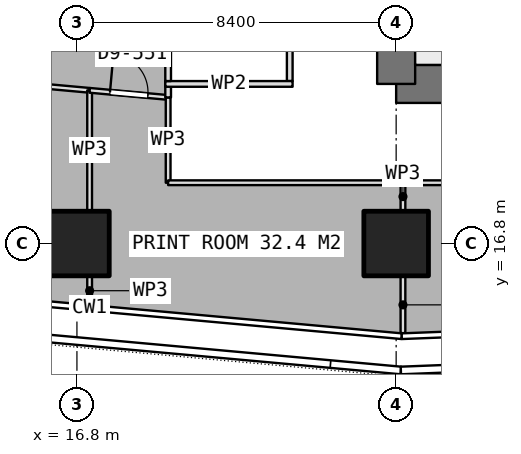
"""IFC4 building model, lengths in metres.
Left out: names, types, materials, properties, quantities, classifications, styles, units other than length and angle.
Written with IfcOpenShell. Run it as: python <this file> out.ifc"""

import sys

from ifc_helpers import new_model, si_unit, direction, frame, frame_2d, origin, origin_2d, place, context, subcontext, project, spatial, rectangle, extrude, element, fill, save


model = new_model("IFC4")
c1 = context("Model", 3, precision=1e-05, world=origin(), true_north=direction((0.0, 1.0)))
c2 = subcontext(c1, "Body", "Model", "MODEL_VIEW")
j1 = project(units=[si_unit("LENGTHUNIT", "METRE"), si_unit("PLANEANGLEUNIT", "RADIAN")], contexts=[c1])
p1 = place(None, origin())
s1 = spatial("IfcSite", under=j1, at=p1, CompositionType="ELEMENT")
p2 = place(p1, origin())
s2 = spatial("IfcBuilding", under=s1, at=p2, CompositionType="ELEMENT")
p3 = place(p2, frame((0.0, 0.0, 140.3)))
s3 = spatial("IfcBuildingStorey", under=s2, at=p3, CompositionType="ELEMENT", Elevation=140.3)
p4 = place(p3, frame((25.2, 21.0, 0.0), z_axis=(0.0, 0.0, 1.0), x_axis=(1.0, 0.0, 0.0)))
e1 = element("IfcWall", 1, at=p4, inside=s3, PredefinedType="SHEAR", context=c2, shape_type="SweptSolid", body=[
    extrude(rectangle(XDim=10.4, YDim=1.0, at=frame_2d((5.2, 0.0))), origin(), (0.0, 0.0, 1.0), 3.75),
])
p5 = place(p3, frame((25.2, 21.0, 0.0), z_axis=(0.0, 0.0, 1.0), x_axis=(0.0, 1.0, 0.0)))
e2 = element("IfcWall", 2, at=p5, inside=s3, PredefinedType="SHEAR", context=c2, shape_type="SweptSolid", body=[
    extrude(rectangle(XDim=25.2, YDim=1.0, at=frame_2d((12.6, 0.0))), origin(), (0.0, 0.0, 1.0), 3.75),
])
p6 = place(p5, frame((7.8, 0.0, 0.0)))
e3 = element("IfcOpeningElement", 3, at=p6, cuts=e2, PredefinedType="OPENING", context=c2, shape_type="SweptSolid", body=[
    extrude(rectangle(XDim=1.2, YDim=2.1, at=frame_2d((0.6, 1.05))), frame((0.0, 0.51, 0.0), z_axis=(0.0, -1.0, 0.0), x_axis=(1.0, 0.0, 0.0)), (0.0, 0.0, 1.0), 1.02),
])
p7 = place(p5, frame((14.25, 0.0, 0.0)))
e4 = element("IfcOpeningElement", 4, at=p7, cuts=e2, PredefinedType="OPENING", context=c2, shape_type="SweptSolid", body=[
    extrude(rectangle(XDim=0.9, YDim=2.1, at=frame_2d((0.45, 1.05))), frame((0.0, 0.51, 0.0), z_axis=(0.0, -1.0, 0.0), x_axis=(1.0, 0.0, 0.0)), (0.0, 0.0, 1.0), 1.02),
])
p8 = place(p5, frame((16.85, 0.0, 0.0)))
e5 = element("IfcOpeningElement", 5, at=p8, cuts=e2, PredefinedType="OPENING", context=c2, shape_type="SweptSolid", body=[
    extrude(rectangle(XDim=0.9, YDim=2.1, at=frame_2d((0.45, 1.05))), frame((0.0, 0.51, 0.0), z_axis=(0.0, -1.0, 0.0), x_axis=(1.0, 0.0, 0.0)), (0.0, 0.0, 1.0), 1.02),
])
p9 = place(p5, frame((19.025, 0.0, 0.0)))
e6 = element("IfcOpeningElement", 6, at=p9, cuts=e2, PredefinedType="OPENING", context=c2, shape_type="SweptSolid", body=[
    extrude(rectangle(XDim=1.2, YDim=2.1, at=frame_2d((0.6, 1.05))), frame((0.0, 0.51, 0.0), z_axis=(0.0, -1.0, 0.0), x_axis=(1.0, 0.0, 0.0)), (0.0, 0.0, 1.0), 1.02),
])
for number, where, z_axis, x_axis in (
    (7, (16.8, 16.8, 0.0), (0.0, 0.0, 1.0), (1.0, 0.0, 0.0)),
    (8, (25.2, 16.8, 0.0), (0.0, 0.0, 1.0), (1.0, 0.0, 0.0)),
):
    element("IfcColumn", number, at=place(p3, frame(where, z_axis=z_axis, x_axis=x_axis)), inside=s3, PredefinedType="COLUMN", context=c2, shape_type="SweptSolid", body=[
        extrude(rectangle(XDim=1.7, YDim=1.7, at=origin_2d()), origin(), (0.0, 0.0, 1.0), 3.75),
    ])
p10 = place(p3, frame((19.125, 21.0, 0.0), z_axis=(0.0, 0.0, 1.0), x_axis=(1.0, 0.0, 0.0)))
e9 = element("IfcWall", 9, at=p10, inside=s3, PredefinedType="PARTITIONING", context=c2, shape_type="SweptSolid", body=[
    extrude(rectangle(XDim=3.35, YDim=0.15, at=frame_2d((1.675, 0.0))), origin(), (0.0, 0.0, 1.0), 3.5),
])
p11 = place(p3, frame((19.2, 21.075, 0.0), z_axis=(0.0, 0.0, 1.0), x_axis=(0.0, 1.0, 0.0)))
e10 = element("IfcWall", 10, at=p11, inside=s3, PredefinedType="PARTITIONING", context=c2, shape_type="SweptSolid", body=[
    extrude(rectangle(XDim=6.85, YDim=0.15, at=frame_2d((3.425, 0.0))), origin(), (0.0, 0.0, 1.0), 3.5),
])
p12 = place(p3, frame((22.4, 21.075, 0.0), z_axis=(0.0, 0.0, 1.0), x_axis=(0.0, 1.0, 0.0)))
e11 = element("IfcWall", 11, at=p12, inside=s3, PredefinedType="PARTITIONING", context=c2, shape_type="SweptSolid", body=[
    extrude(rectangle(XDim=6.85, YDim=0.15, at=frame_2d((3.425, 0.0))), origin(), (0.0, 0.0, 1.0), 3.5),
])
p13 = place(p12, frame((2.925, 0.0, 0.0)))
e12 = element("IfcOpeningElement", 12, at=p13, cuts=e11, PredefinedType="OPENING", context=c2, shape_type="SweptSolid", body=[
    extrude(rectangle(XDim=1.0, YDim=2.1, at=frame_2d((0.5, 1.05))), frame((0.0, 0.085, 0.0), z_axis=(0.0, -1.0, 0.0), x_axis=(1.0, 0.0, 0.0)), (0.0, 0.0, 1.0), 0.17),
])
p14 = place(p3, frame((12.546, 21.248, 0.0), z_axis=(0.0, 0.0, 1.0), x_axis=(0.995895378021, -0.090511855779, 0.0)))
e13 = element("IfcWall", 13, at=p14, inside=s3, PredefinedType="PARTITIONING", context=c2, shape_type="SweptSolid", body=[
    extrude(rectangle(XDim=4.607, YDim=0.125, at=frame_2d((2.303, 0.0))), origin(), (0.0, 0.0, 1.0), 3.5),
])
p15 = place(p3, frame((17.134, 20.831, 0.0), z_axis=(0.0, 0.0, 1.0), x_axis=(0.0, -1.0, 0.0)))
e14 = element("IfcWall", 14, at=p15, inside=s3, PredefinedType="PARTITIONING", context=c2, shape_type="SweptSolid", body=[
    extrude(rectangle(XDim=3.161, YDim=0.125, at=frame_2d((1.581, 0.0))), origin(), (0.0, 0.0, 1.0), 3.5),
])
p16 = place(p3, frame((17.134, 15.93, 0.0), z_axis=(0.0, 0.0, 1.0), x_axis=(0.0, -1.0, 0.0)))
e15 = element("IfcWall", 15, at=p16, inside=s3, PredefinedType="PARTITIONING", context=c2, shape_type="SweptSolid", body=[
    extrude(rectangle(XDim=0.742, YDim=0.125, at=frame_2d((0.371, 0.0))), origin(), (0.0, 0.0, 1.0), 3.5),
])
p17 = place(p3, frame((17.135, 20.831, 0.0), z_axis=(0.0, 0.0, 1.0), x_axis=(0.995924033596, -0.090196004934, 0.0)))
e16 = element("IfcWall", 16, at=p17, inside=s3, PredefinedType="PARTITIONING", context=c2, shape_type="SweptSolid", body=[
    extrude(rectangle(XDim=2.073, YDim=0.125, at=frame_2d((1.037, 0.0))), origin(), (0.0, 0.0, 1.0), 3.5),
])
p18 = place(p17, frame((0.537, 0.0, 0.0)))
e17 = element("IfcOpeningElement", 17, at=p18, cuts=e16, PredefinedType="OPENING", context=c2, shape_type="SweptSolid", body=[
    extrude(rectangle(XDim=1.0, YDim=2.1, at=frame_2d((0.5, 1.05))), frame((0.0, 0.073, 0.0), z_axis=(0.0, -1.0, 0.0), x_axis=(1.0, 0.0, 0.0)), (0.0, 0.0, 1.0), 0.145),
])
p19 = place(p3, frame((19.2, 20.644, 0.0), z_axis=(0.0, 0.0, 1.0), x_axis=(0.0, -1.0, 0.0)))
e18 = element("IfcWall", 18, at=p19, inside=s3, PredefinedType="PARTITIONING", context=c2, shape_type="SweptSolid", body=[
    extrude(rectangle(XDim=2.244, YDim=0.125, at=frame_2d((1.122, 0.0))), origin(), (0.0, 0.0, 1.0), 3.5),
])
p20 = place(p3, frame((19.2, 18.4, 0.0), z_axis=(0.0, 0.0, 1.0), x_axis=(1.0, 0.0, 0.0)))
e19 = element("IfcWall", 19, at=p20, inside=s3, PredefinedType="PARTITIONING", context=c2, shape_type="SweptSolid", body=[
    extrude(rectangle(XDim=6.179, YDim=0.125, at=frame_2d((3.089, 0.0))), origin(), (0.0, 0.0, 1.0), 3.5),
])
p21 = place(p3, frame((25.379, 18.4, 0.0), z_axis=(0.0, 0.0, 1.0), x_axis=(0.0, -1.0, 0.0)))
e20 = element("IfcWall", 20, at=p21, inside=s3, PredefinedType="PARTITIONING", context=c2, shape_type="SweptSolid", body=[
    extrude(rectangle(XDim=0.73, YDim=0.125, at=frame_2d((0.365, 0.0))), origin(), (0.0, 0.0, 1.0), 3.5),
])
p22 = place(p3, frame((25.379, 15.93, 0.0), z_axis=(0.0, 0.0, 1.0), x_axis=(0.0, -1.0, 0.0)))
e21 = element("IfcWall", 21, at=p22, inside=s3, PredefinedType="PARTITIONING", context=c2, shape_type="SweptSolid", body=[
    extrude(rectangle(XDim=1.487, YDim=0.125, at=frame_2d((0.743, 0.0))), origin(), (0.0, 0.0, 1.0), 3.5),
])
p23 = place(p3, frame((25.38, 18.4, 0.0), z_axis=(0.0, 0.0, 1.0), x_axis=(1.0, 0.0, 0.0)))
e22 = element("IfcWall", 22, at=p23, inside=s3, PredefinedType="PARTITIONING", context=c2, shape_type="SweptSolid", body=[
    extrude(rectangle(XDim=8.164, YDim=0.125, at=frame_2d((4.082, 0.0))), origin(), (0.0, 0.0, 1.0), 3.5),
])
p24 = place(p23, frame((3.582, 0.0, 0.0)))
e23 = element("IfcOpeningElement", 23, at=p24, cuts=e22, PredefinedType="OPENING", context=c2, shape_type="SweptSolid", body=[
    extrude(rectangle(XDim=1.0, YDim=2.1, at=frame_2d((0.5, 1.05))), frame((0.0, 0.073, 0.0), z_axis=(0.0, -1.0, 0.0), x_axis=(1.0, 0.0, 0.0)), (0.0, 0.0, 1.0), 0.145),
])
p25 = place(p3, frame((19.2, 21.075, 0.0), z_axis=(0.0, 0.0, 1.0), x_axis=(0.0, -1.0, 0.0)))
e24 = element("IfcWall", 24, at=p25, inside=s3, PredefinedType="PARTITIONING", context=c2, shape_type="SweptSolid", body=[
    extrude(rectangle(XDim=0.431, YDim=0.15, at=frame_2d((0.215, 0.0))), origin(), (0.0, 0.0, 1.0), 3.5),
])
p26 = place(p18, origin())
e25 = element("IfcDoor", 25, at=p26, inside=s3, OperationType="SINGLE_SWING_LEFT", PredefinedType="DOOR", context=c2, shape_type="SweptSolid", body=[
    extrude(rectangle(XDim=1.0, YDim=2.1, at=frame_2d((0.5, 1.05))), frame((0.0, 0.025, 0.0), z_axis=(0.0, -1.0, 0.0), x_axis=(1.0, 0.0, 0.0)), (0.0, 0.0, 1.0), 0.05),
])
fill(e17, e25)
save(model, sys.argv[1])
